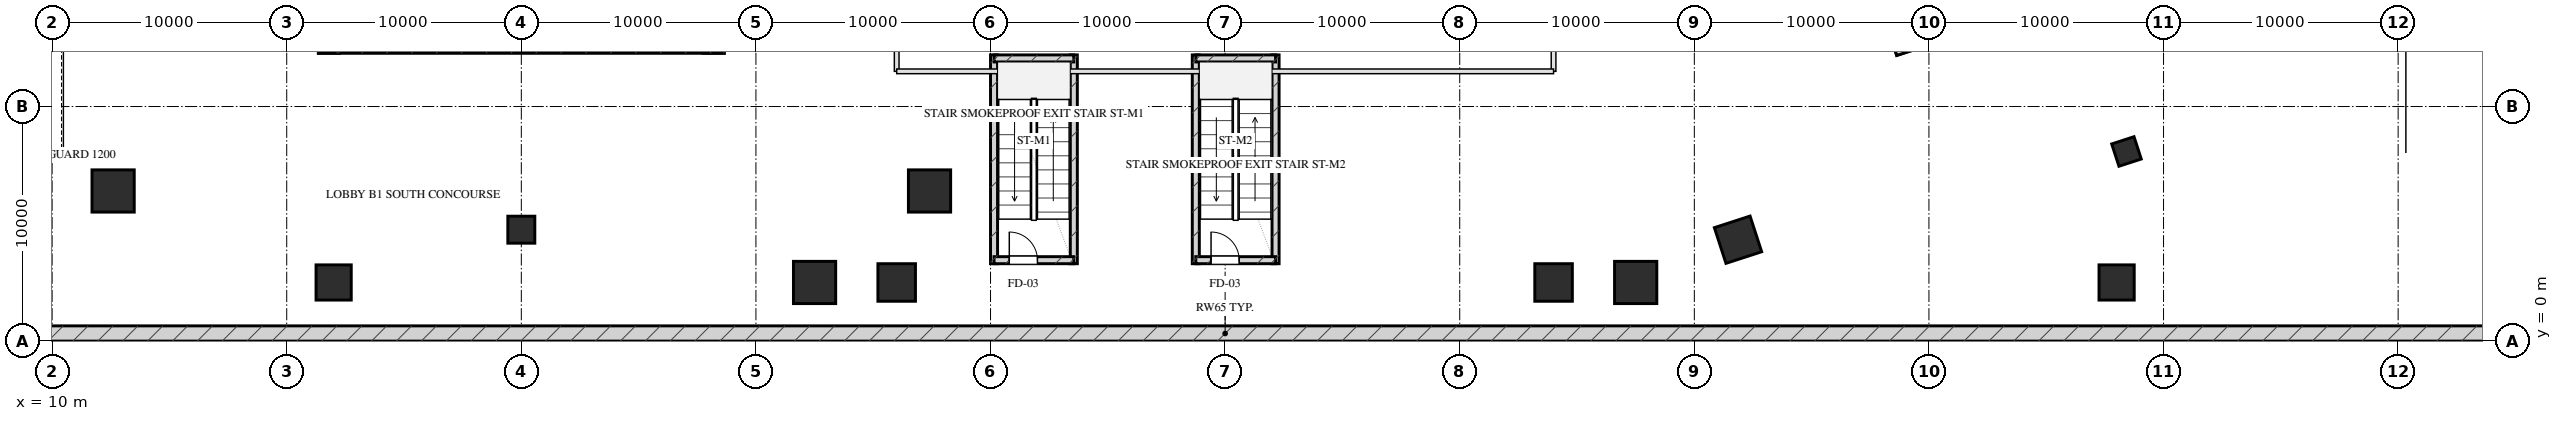
"""IFC4 building model, lengths in metres.
Left out: names, types, materials, properties, quantities, classifications, styles, units other than length and angle.
Written with IfcOpenShell. Run it as: python <this file> out.ifc"""

import sys

from ifc_helpers import new_model, si_unit, direction, frame, frame_2d, origin, origin_2d, place, context, subcontext, project, spatial, rectangle, hollow_rectangle, extrude, element, fill, save


model = new_model("IFC4")
c1 = context("Model", 3, precision=1e-05, world=origin(), true_north=direction((0.0, 1.0)))
c2 = subcontext(c1, "Body", "Model", "MODEL_VIEW")
j1 = project(units=[si_unit("LENGTHUNIT", "METRE"), si_unit("PLANEANGLEUNIT", "RADIAN")], contexts=[c1])
p1 = place(None, origin())
s1 = spatial("IfcSite", under=j1, at=p1, CompositionType="ELEMENT")
p2 = place(p1, origin())
s2 = spatial("IfcBuilding", under=s1, at=p2, CompositionType="ELEMENT")
p3 = place(p2, frame((0.0, 0.0, -6.0)))
s3 = spatial("IfcBuildingStorey", under=s2, at=p3, CompositionType="ELEMENT", Elevation=-6.0)
p4 = place(p3, frame((21.35, 12.72, 0.0), z_axis=(0.0, 0.0, 1.0), x_axis=(1.0, 0.0, 0.0)))
e1 = element("IfcWall", 1, at=p4, inside=s3, PredefinedType="SHEAR", context=c2, shape_type="SweptSolid", body=[
    extrude(rectangle(XDim=17.3, YDim=0.9, at=frame_2d((8.65, 0.0))), origin(), (0.0, 0.0, 1.0), 6.0),
])
for number, where, z_axis, x_axis in (
    (2, (21.8, 22.05, 0.0), (0.0, 0.0, 1.0), (0.0, -1.0, 0.0)),
    (3, (38.2, 22.05, 0.0), (0.0, 0.0, 1.0), (0.0, -1.0, 0.0)),
):
    element("IfcWall", number, at=place(p3, frame(where, z_axis=z_axis, x_axis=x_axis)), inside=s3, PredefinedType="SHEAR", context=c2, shape_type="SweptSolid", body=[
        extrude(rectangle(XDim=9.78, YDim=0.9, at=frame_2d((4.89, 0.0))), origin(), (0.0, 0.0, 1.0), 6.0),
    ])
p5 = place(p3, frame((88.487, 12.605, 0.0), z_axis=(0.0, 0.0, 1.0), x_axis=(0.951055016115, 0.309021611416, 0.0)))
e4 = element("IfcWall", 4, at=p5, inside=s3, PredefinedType="SHEAR", context=c2, shape_type="SweptSolid", body=[
    extrude(rectangle(XDim=16.7, YDim=0.9, at=frame_2d((8.35, 0.0))), origin(), (0.0, 0.0, 1.0), 6.0),
])
p6 = place(p3, frame((86.032, 21.618, 0.0), z_axis=(0.0, 0.0, 1.0), x_axis=(0.30901438634, -0.951057363693, 0.0)))
e5 = element("IfcWall", 5, at=p6, inside=s3, PredefinedType="SHEAR", context=c2, shape_type="SweptSolid", body=[
    extrude(rectangle(XDim=9.78, YDim=0.9, at=frame_2d((4.89, 0.0))), origin(), (0.0, 0.0, 1.0), 6.0),
])
for number, where, z_axis, x_axis in (
    (6, (50.15, 3.3, 0.0), (0.0, 0.0, 1.0), (0.0, 1.0, 0.0)),
    (7, (53.55, 3.3, 0.0), (0.0, 0.0, 1.0), (0.0, 1.0, 0.0)),
):
    element("IfcWall", number, at=place(p3, frame(where, z_axis=z_axis, x_axis=x_axis)), inside=s3, PredefinedType="SHEAR", context=c2, shape_type="SweptSolid", body=[
        extrude(rectangle(XDim=8.9, YDim=0.3, at=frame_2d((4.45, 0.0))), origin(), (0.0, 0.0, 1.0), 6.0),
    ])
p7 = place(p3, frame((50.15, 12.05, 0.0), z_axis=(0.0, 0.0, 1.0), x_axis=(1.0, 0.0, 0.0)))
e8 = element("IfcWall", 8, at=p7, inside=s3, PredefinedType="SHEAR", context=c2, shape_type="SweptSolid", body=[
    extrude(rectangle(XDim=3.4, YDim=0.3, at=frame_2d((1.7, 0.0))), origin(), (0.0, 0.0, 1.0), 6.0),
])
p8 = place(p3, frame((50.15, 3.45, 0.0), z_axis=(0.0, 0.0, 1.0), x_axis=(1.0, 0.0, 0.0)))
e9 = element("IfcWall", 9, at=p8, inside=s3, PredefinedType="SHEAR", context=c2, shape_type="SweptSolid", body=[
    extrude(rectangle(XDim=3.4, YDim=0.3, at=frame_2d((1.7, 0.0))), origin(), (0.0, 0.0, 1.0), 6.0),
])
p9 = place(p8, frame((0.65, 0.0, 0.0)))
e10 = element("IfcOpeningElement", 10, at=p9, cuts=e9, PredefinedType="OPENING", context=c2, shape_type="SweptSolid", body=[
    extrude(rectangle(XDim=1.2, YDim=2.05, at=frame_2d((0.6, 1.025))), frame((0.0, 0.16, 0.0), z_axis=(0.0, -1.0, 0.0), x_axis=(1.0, 0.0, 0.0)), (0.0, 0.0, 1.0), 0.32),
])
for number, where, z_axis, x_axis in (
    (11, (58.75, 3.3, 0.0), (0.0, 0.0, 1.0), (0.0, 1.0, 0.0)),
    (12, (62.15, 3.3, 0.0), (0.0, 0.0, 1.0), (0.0, 1.0, 0.0)),
):
    element("IfcWall", number, at=place(p3, frame(where, z_axis=z_axis, x_axis=x_axis)), inside=s3, PredefinedType="SHEAR", context=c2, shape_type="SweptSolid", body=[
        extrude(rectangle(XDim=8.9, YDim=0.3, at=frame_2d((4.45, 0.0))), origin(), (0.0, 0.0, 1.0), 6.0),
    ])
p10 = place(p3, frame((58.75, 12.05, 0.0), z_axis=(0.0, 0.0, 1.0), x_axis=(1.0, 0.0, 0.0)))
e13 = element("IfcWall", 13, at=p10, inside=s3, PredefinedType="SHEAR", context=c2, shape_type="SweptSolid", body=[
    extrude(rectangle(XDim=3.4, YDim=0.3, at=frame_2d((1.7, 0.0))), origin(), (0.0, 0.0, 1.0), 6.0),
])
p11 = place(p3, frame((58.75, 3.45, 0.0), z_axis=(0.0, 0.0, 1.0), x_axis=(1.0, 0.0, 0.0)))
e14 = element("IfcWall", 14, at=p11, inside=s3, PredefinedType="SHEAR", context=c2, shape_type="SweptSolid", body=[
    extrude(rectangle(XDim=3.4, YDim=0.3, at=frame_2d((1.7, 0.0))), origin(), (0.0, 0.0, 1.0), 6.0),
])
p12 = place(p11, frame((0.65, 0.0, 0.0)))
e15 = element("IfcOpeningElement", 15, at=p12, cuts=e14, PredefinedType="OPENING", context=c2, shape_type="SweptSolid", body=[
    extrude(rectangle(XDim=1.2, YDim=2.05, at=frame_2d((0.6, 1.025))), frame((0.0, 0.16, 0.0), z_axis=(0.0, -1.0, 0.0), x_axis=(1.0, 0.0, 0.0)), (0.0, 0.0, 1.0), 0.32),
])
p13 = place(p3, frame((0.325, 0.325, 0.0), z_axis=(0.0, 0.0, 1.0), x_axis=(1.0, 0.0, 0.0)))
e16 = element("IfcWall", 16, at=p13, inside=s3, PredefinedType="SHEAR", context=c2, shape_type="SweptSolid", body=[
    extrude(rectangle(XDim=119.35, YDim=0.65, at=frame_2d((59.675, 0.0))), origin(), (0.0, 0.0, 1.0), 6.0),
])
p14 = place(p3, frame((22.0, 2.5, 0.0), z_axis=(0.0, 0.0, 1.0), x_axis=(1.0, 0.0, 0.0)))
e17 = element("IfcColumn", 17, at=p14, inside=s3, PredefinedType="COLUMN", context=c2, shape_type="SweptSolid", body=[
    extrude(rectangle(XDim=1.5, YDim=1.5, at=origin_2d()), origin(), (0.0, 0.0, 1.0), 6.001),
])
for number, where, z_axis, x_axis in (
    (18, (42.5, 2.5, 0.0), (0.0, 0.0, 1.0), (1.0, 0.0, 0.0)),
    (19, (77.5, 2.5, 0.0), (0.0, 0.0, 1.0), (1.0, 0.0, 0.0)),
):
    element("IfcColumn", number, at=place(p3, frame(where, z_axis=z_axis, x_axis=x_axis)), inside=s3, PredefinedType="COLUMN", context=c2, shape_type="SweptSolid", body=[
        extrude(hollow_rectangle(XDim=1.8, YDim=1.8, WallThickness=0.06, at=origin_2d()), origin(), (0.0, 0.0, 1.0), 6.001),
    ])
p15 = place(p3, frame((98.0, 2.5, 0.0), z_axis=(0.0, 0.0, 1.0), x_axis=(1.0, 0.0, 0.0)))
e20 = element("IfcColumn", 20, at=p15, inside=s3, PredefinedType="COLUMN", context=c2, shape_type="SweptSolid", body=[
    extrude(rectangle(XDim=1.5, YDim=1.5, at=origin_2d()), origin(), (0.0, 0.0, 1.0), 6.001),
])
for number, where, z_axis, x_axis in (
    (21, (46.0, 2.5, 0.0), (0.0, 0.0, 1.0), (1.0, 0.0, 0.0)),
    (22, (74.0, 2.5, 0.0), (0.0, 0.0, 1.0), (1.0, 0.0, 0.0)),
):
    element("IfcColumn", number, at=place(p3, frame(where, z_axis=z_axis, x_axis=x_axis)), inside=s3, PredefinedType="COLUMN", context=c2, shape_type="SweptSolid", body=[
        extrude(hollow_rectangle(XDim=1.6, YDim=1.6, WallThickness=0.055, at=origin_2d()), origin(), (0.0, 0.0, 1.0), 6.001),
    ])
for number, where, z_axis, x_axis in (
    (23, (12.6, 6.4, 0.0), (0.0, 0.0, 1.0), (1.0, 0.0, 0.0)),
    (24, (47.4, 6.4, 0.0), (0.0, 0.0, 1.0), (1.0, 0.0, 0.0)),
):
    element("IfcColumn", number, at=place(p3, frame(where, z_axis=z_axis, x_axis=x_axis)), inside=s3, PredefinedType="COLUMN", context=c2, shape_type="SweptSolid", body=[
        extrude(hollow_rectangle(XDim=1.8, YDim=1.8, WallThickness=0.06, at=origin_2d()), origin(), (0.0, 0.0, 1.0), 6.001),
    ])
p16 = place(p3, frame((30.0, 4.75, 0.0), z_axis=(0.0, 0.0, 1.0), x_axis=(1.0, 0.0, 0.0)))
e25 = element("IfcColumn", 25, at=p16, inside=s3, PredefinedType="COLUMN", context=c2, shape_type="SweptSolid", body=[
    extrude(hollow_rectangle(XDim=1.15, YDim=1.15, WallThickness=0.04, at=origin_2d()), origin(), (0.0, 0.0, 1.0), 6.001),
])
p17 = place(p3, frame((81.863, 4.323, 0.0), z_axis=(0.0, 0.0, 1.0), x_axis=(0.951056516295, 0.309016994375, 0.0)))
e26 = element("IfcColumn", 26, at=p17, inside=s3, PredefinedType="COLUMN", context=c2, shape_type="SweptSolid", body=[
    extrude(hollow_rectangle(XDim=1.6, YDim=1.6, WallThickness=0.055, at=origin_2d()), origin(), (0.0, 0.0, 1.0), 6.001),
])
p18 = place(p3, frame((98.421, 8.084, 0.0), z_axis=(0.0, 0.0, 1.0), x_axis=(0.951056516295, 0.309016994375, 0.0)))
e27 = element("IfcColumn", 27, at=p18, inside=s3, PredefinedType="COLUMN", context=c2, shape_type="SweptSolid", body=[
    extrude(hollow_rectangle(XDim=1.0, YDim=1.0, WallThickness=0.036, at=origin_2d()), origin(), (0.0, 0.0, 1.0), 6.001),
])
p19 = place(p3, frame((46.0, 11.5, 0.0), z_axis=(0.0, 0.0, 1.0), x_axis=(0.0, 1.0, 0.0)))
e28 = element("IfcWall", 28, at=p19, inside=s3, PredefinedType="PARTITIONING", context=c2, shape_type="SweptSolid", body=[
    extrude(rectangle(XDim=45.0, YDim=0.2, at=frame_2d((22.5, 0.0))), origin(), (0.0, 0.0, 1.0), 5.685),
])
p20 = place(p19, frame((18.0, 0.0, 0.0)))
e29 = element("IfcOpeningElement", 29, at=p20, cuts=e28, PredefinedType="OPENING", context=c2, shape_type="SweptSolid", body=[
    extrude(rectangle(XDim=1.8, YDim=2.05, at=frame_2d((0.9, 1.025))), frame((0.0, 0.11, 0.0), z_axis=(0.0, -1.0, 0.0), x_axis=(1.0, 0.0, 0.0)), (0.0, 0.0, 1.0), 0.22),
])
p21 = place(p3, frame((74.0, 11.5, 0.0), z_axis=(0.0, 0.0, 1.0), x_axis=(0.0, 1.0, 0.0)))
e30 = element("IfcWall", 30, at=p21, inside=s3, PredefinedType="PARTITIONING", context=c2, shape_type="SweptSolid", body=[
    extrude(rectangle(XDim=45.0, YDim=0.2, at=frame_2d((22.5, 0.0))), origin(), (0.0, 0.0, 1.0), 5.685),
])
p22 = place(p21, frame((18.0, 0.0, 0.0)))
e31 = element("IfcOpeningElement", 31, at=p22, cuts=e30, PredefinedType="OPENING", context=c2, shape_type="SweptSolid", body=[
    extrude(rectangle(XDim=1.8, YDim=2.05, at=frame_2d((0.9, 1.025))), frame((0.0, 0.11, 0.0), z_axis=(0.0, -1.0, 0.0), x_axis=(1.0, 0.0, 0.0)), (0.0, 0.0, 1.0), 0.22),
])
p23 = place(p3, frame((46.0, 11.5, 0.0), z_axis=(0.0, 0.0, 1.0), x_axis=(1.0, 0.0, 0.0)))
e32 = element("IfcWall", 32, at=p23, inside=s3, PredefinedType="PARTITIONING", context=c2, shape_type="SweptSolid", body=[
    extrude(rectangle(XDim=28.0, YDim=0.2, at=frame_2d((14.0, 0.0))), origin(), (0.0, 0.0, 1.0), 5.685),
])
p24 = place(p9, origin())
e33 = element("IfcDoor", 33, at=p24, inside=s3, OperationType="SINGLE_SWING_LEFT", PredefinedType="DOOR", context=c2, shape_type="SweptSolid", body=[
    extrude(rectangle(XDim=1.2, YDim=2.05, at=frame_2d((0.6, 1.025))), frame((0.0, 0.025, 0.0), z_axis=(0.0, -1.0, 0.0), x_axis=(1.0, 0.0, 0.0)), (0.0, 0.0, 1.0), 0.05),
])
fill(e10, e33)
p25 = place(p12, origin())
e34 = element("IfcDoor", 34, at=p25, inside=s3, OperationType="SINGLE_SWING_LEFT", PredefinedType="DOOR", context=c2, shape_type="SweptSolid", body=[
    extrude(rectangle(XDim=1.2, YDim=2.05, at=frame_2d((0.6, 1.025))), frame((0.0, 0.025, 0.0), z_axis=(0.0, -1.0, 0.0), x_axis=(1.0, 0.0, 0.0)), (0.0, 0.0, 1.0), 0.05),
])
fill(e15, e34)
save(model, sys.argv[1])
